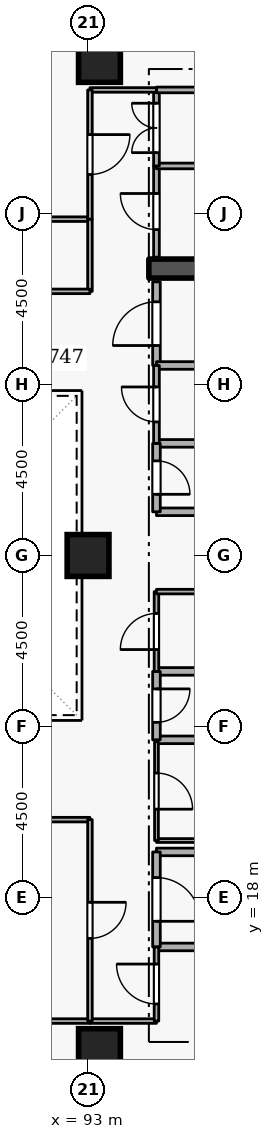
"""IFC4 building model, lengths in metres.
Left out: names, types, materials, properties, quantities, classifications, styles, units other than length and angle.
Written with IfcOpenShell. Run it as: python <this file> out.ifc"""

import sys

from ifc_helpers import new_model, si_unit, direction, frame, frame_2d, origin, origin_2d, place, context, subcontext, project, spatial, rectangle, extrude, element, fill, save


model = new_model("IFC4")
c1 = context("Model", 3, precision=1e-05, world=origin(), true_north=direction((0.0, 1.0)))
c2 = subcontext(c1, "Body", "Model", "MODEL_VIEW")
j1 = project(units=[si_unit("LENGTHUNIT", "METRE"), si_unit("PLANEANGLEUNIT", "RADIAN")], contexts=[c1])
p1 = place(None, origin())
s1 = spatial("IfcSite", under=j1, at=p1, CompositionType="ELEMENT")
p2 = place(p1, origin())
s2 = spatial("IfcBuilding", under=s1, at=p2, CompositionType="ELEMENT")
p3 = place(p2, frame((0.0, 0.0, 145.5)))
s3 = spatial("IfcBuildingStorey", under=s2, at=p3, CompositionType="ELEMENT", Elevation=145.5)
p4 = place(p3, frame((94.6, 34.55, 0.0), z_axis=(0.0, 0.0, 1.0), x_axis=(1.0, 0.0, 0.0)))
e1 = element("IfcWall", 1, at=p4, inside=s3, PredefinedType="SHEAR", context=c2, shape_type="SweptSolid", body=[
    extrude(rectangle(XDim=5.8, YDim=0.5, at=frame_2d((2.9, 0.0))), origin(), (0.0, 0.0, 1.0), 3.6),
])
for number, where, z_axis, x_axis in (
    (2, (93.3, 14.0, 0.0), (0.0, 0.0, 1.0), (1.0, 0.0, 0.0)),
    (3, (93.3, 40.0, 0.0), (0.0, 0.0, 1.0), (1.0, 0.0, 0.0)),
    (4, (93.0, 27.0, 0.0), (0.0, 0.0, 1.0), (1.0, 0.0, 0.0)),
):
    element("IfcColumn", number, at=place(p3, frame(where, z_axis=z_axis, x_axis=x_axis)), inside=s3, PredefinedType="COLUMN", context=c2, shape_type="SweptSolid", body=[
        extrude(rectangle(XDim=1.1, YDim=1.1, at=origin_2d()), origin(), (0.0, 0.0, 1.0), 3.6),
    ])
p5 = place(p3, frame((94.8, 16.7, 0.0), z_axis=(0.0, 0.0, 1.0), x_axis=(1.0, 0.0, 0.0)))
e5 = element("IfcWall", 5, at=p5, inside=s3, PredefinedType="STANDARD", context=c2, shape_type="SweptSolid", body=[
    extrude(rectangle(XDim=5.7, YDim=0.2, at=frame_2d((2.85, 0.0))), origin(), (0.0, 0.0, 1.0), 3.3),
])
p6 = place(p3, frame((97.1, 19.2, 0.0), z_axis=(0.0, 0.0, 1.0), x_axis=(-1.0, 0.0, 0.0)))
e6 = element("IfcWall", 6, at=p6, inside=s3, PredefinedType="STANDARD", context=c2, shape_type="SweptSolid", body=[
    extrude(rectangle(XDim=2.3, YDim=0.2, at=frame_2d((1.15, 0.0))), origin(), (0.0, 0.0, 1.0), 2.505),
])
p7 = place(p3, frame((94.8, 19.2, 0.0), z_axis=(0.0, 0.0, 1.0), x_axis=(0.0, -1.0, 0.0)))
e7 = element("IfcWall", 7, at=p7, inside=s3, PredefinedType="STANDARD", context=c2, shape_type="SweptSolid", body=[
    extrude(rectangle(XDim=2.5, YDim=0.2, at=frame_2d((1.25, 0.0))), origin(), (0.0, 0.0, 1.0), 3.3),
])
p8 = place(p7, frame((0.675, 0.0, 0.0)))
e8 = element("IfcOpeningElement", 8, at=p8, cuts=e7, PredefinedType="OPENING", context=c2, shape_type="SweptSolid", body=[
    extrude(rectangle(XDim=1.15, YDim=2.1, at=frame_2d((0.575, 1.05))), frame((0.0, 0.11, 0.0), z_axis=(0.0, -1.0, 0.0), x_axis=(1.0, 0.0, 0.0)), (0.0, 0.0, 1.0), 0.22),
])
for number, where, z_axis, x_axis in (
    (9, (94.8, 28.15, 0.0), (0.0, 0.0, 1.0), (1.0, 0.0, 0.0)),
    (10, (96.85, 29.95, 0.0), (0.0, 0.0, 1.0), (-1.0, 0.0, 0.0)),
):
    element("IfcWall", number, at=place(p3, frame(where, z_axis=z_axis, x_axis=x_axis)), inside=s3, PredefinedType="STANDARD", context=c2, shape_type="SweptSolid", body=[
        extrude(rectangle(XDim=2.05, YDim=0.2, at=frame_2d((1.025, 0.0))), origin(), (0.0, 0.0, 1.0), 3.3),
    ])
p9 = place(p3, frame((94.8, 29.95, 0.0), z_axis=(0.0, 0.0, 1.0), x_axis=(0.0, -1.0, 0.0)))
e11 = element("IfcWall", 11, at=p9, inside=s3, PredefinedType="STANDARD", context=c2, shape_type="SweptSolid", body=[
    extrude(rectangle(XDim=1.8, YDim=0.2, at=frame_2d((0.9, 0.0))), origin(), (0.0, 0.0, 1.0), 3.3),
])
p10 = place(p9, frame((0.46, 0.0, 0.0)))
e12 = element("IfcOpeningElement", 12, at=p10, cuts=e11, PredefinedType="OPENING", context=c2, shape_type="SweptSolid", body=[
    extrude(rectangle(XDim=0.88, YDim=2.04, at=frame_2d((0.44, 1.02))), frame((0.0, 0.11, 0.0), z_axis=(0.0, -1.0, 0.0), x_axis=(1.0, 0.0, 0.0)), (0.0, 0.0, 1.0), 0.22),
])
for number, where, z_axis, x_axis in (
    (13, (94.8, 22.15, 0.0), (0.0, 0.0, 1.0), (1.0, 0.0, 0.0)),
    (14, (96.85, 23.95, 0.0), (0.0, 0.0, 1.0), (-1.0, 0.0, 0.0)),
):
    element("IfcWall", number, at=place(p3, frame(where, z_axis=z_axis, x_axis=x_axis)), inside=s3, PredefinedType="STANDARD", context=c2, shape_type="SweptSolid", body=[
        extrude(rectangle(XDim=2.05, YDim=0.2, at=frame_2d((1.025, 0.0))), origin(), (0.0, 0.0, 1.0), 3.3),
    ])
p11 = place(p3, frame((94.8, 23.95, 0.0), z_axis=(0.0, 0.0, 1.0), x_axis=(0.0, -1.0, 0.0)))
e15 = element("IfcWall", 15, at=p11, inside=s3, PredefinedType="STANDARD", context=c2, shape_type="SweptSolid", body=[
    extrude(rectangle(XDim=1.8, YDim=0.2, at=frame_2d((0.9, 0.0))), origin(), (0.0, 0.0, 1.0), 3.3),
])
p12 = place(p11, frame((0.46, 0.0, 0.0)))
e16 = element("IfcOpeningElement", 16, at=p12, cuts=e15, PredefinedType="OPENING", context=c2, shape_type="SweptSolid", body=[
    extrude(rectangle(XDim=0.88, YDim=2.04, at=frame_2d((0.44, 1.02))), frame((0.0, 0.11, 0.0), z_axis=(0.0, -1.0, 0.0), x_axis=(1.0, 0.0, 0.0)), (0.0, 0.0, 1.0), 0.22),
])
p13 = place(p3, frame((94.8, 32.0, 0.0), z_axis=(0.0, 0.0, 1.0), x_axis=(0.0, 1.0, 0.0)))
e17 = element("IfcWall", 17, at=p13, inside=s3, PredefinedType="STANDARD", context=c2, shape_type="SweptSolid", body=[
    extrude(rectangle(XDim=2.2, YDim=0.2, at=frame_2d((1.1, 0.0))), origin(), (0.0, 0.0, 1.0), 3.3),
])
p14 = place(p13, frame((0.525, 0.0, 0.0)))
e18 = element("IfcOpeningElement", 18, at=p14, cuts=e17, PredefinedType="OPENING", context=c2, shape_type="SweptSolid", body=[
    extrude(rectangle(XDim=1.15, YDim=2.1, at=frame_2d((0.575, 1.05))), frame((0.0, 0.11, 0.0), z_axis=(0.0, -1.0, 0.0), x_axis=(1.0, 0.0, 0.0)), (0.0, 0.0, 1.0), 0.22),
])
p15 = place(p3, frame((96.85, 32.0, 0.0), z_axis=(0.0, 0.0, 1.0), x_axis=(-1.0, 0.0, 0.0)))
e19 = element("IfcWall", 19, at=p15, inside=s3, PredefinedType="STANDARD", context=c2, shape_type="SweptSolid", body=[
    extrude(rectangle(XDim=2.05, YDim=0.2, at=frame_2d((1.025, 0.0))), origin(), (0.0, 0.0, 1.0), 3.3),
])
p16 = place(p3, frame((94.8, 19.5, 0.0), z_axis=(0.0, 0.0, 1.0), x_axis=(1.0, 0.0, 0.0)))
e20 = element("IfcWall", 20, at=p16, inside=s3, PredefinedType="PARTITIONING", context=c2, shape_type="SweptSolid", body=[
    extrude(rectangle(XDim=2.05, YDim=0.1, at=frame_2d((1.025, 0.0))), origin(), (0.0, 0.0, 1.0), 2.505),
])
p17 = place(p3, frame((94.8, 22.1, 0.0), z_axis=(0.0, 0.0, 1.0), x_axis=(0.0, -1.0, 0.0)))
e21 = element("IfcWall", 21, at=p17, inside=s3, PredefinedType="PARTITIONING", context=c2, shape_type="SweptSolid", body=[
    extrude(rectangle(XDim=2.6, YDim=0.1, at=frame_2d((1.3, 0.0))), origin(), (0.0, 0.0, 1.0), 3.3),
])
p18 = place(p17, frame((0.825, 0.0, 0.0)))
e22 = element("IfcOpeningElement", 22, at=p18, cuts=e21, PredefinedType="OPENING", context=c2, shape_type="SweptSolid", body=[
    extrude(rectangle(XDim=0.95, YDim=2.1, at=frame_2d((0.475, 1.05))), frame((0.0, 0.06, 0.0), z_axis=(0.0, -1.0, 0.0), x_axis=(1.0, 0.0, 0.0)), (0.0, 0.0, 1.0), 0.12),
])
p19 = place(p3, frame((94.8, 23.95, 0.0), z_axis=(0.0, 0.0, 1.0), x_axis=(0.0, 1.0, 0.0)))
e23 = element("IfcWall", 23, at=p19, inside=s3, PredefinedType="PARTITIONING", context=c2, shape_type="SweptSolid", body=[
    extrude(rectangle(XDim=2.1, YDim=0.12, at=frame_2d((1.05, 0.0))), origin(), (0.0, 0.0, 1.0), 3.3),
])
p20 = place(p19, frame((0.575, 0.0, 0.0)))
e24 = element("IfcOpeningElement", 24, at=p20, cuts=e23, PredefinedType="OPENING", context=c2, shape_type="SweptSolid", body=[
    extrude(rectangle(XDim=0.95, YDim=2.1, at=frame_2d((0.475, 1.05))), frame((0.0, 0.07, 0.0), z_axis=(0.0, -1.0, 0.0), x_axis=(1.0, 0.0, 0.0)), (0.0, 0.0, 1.0), 0.14),
])
p21 = place(p3, frame((94.8, 26.05, 0.0), z_axis=(0.0, 0.0, 1.0), x_axis=(1.0, 0.0, 0.0)))
e25 = element("IfcWall", 25, at=p21, inside=s3, PredefinedType="PARTITIONING", context=c2, shape_type="SweptSolid", body=[
    extrude(rectangle(XDim=2.05, YDim=0.12, at=frame_2d((1.025, 0.0))), origin(), (0.0, 0.0, 1.0), 3.3),
])
p22 = place(p3, frame((94.8, 29.95, 0.0), z_axis=(0.0, 0.0, 1.0), x_axis=(0.0, 1.0, 0.0)))
e26 = element("IfcWall", 26, at=p22, inside=s3, PredefinedType="PARTITIONING", context=c2, shape_type="SweptSolid", body=[
    extrude(rectangle(XDim=2.05, YDim=0.15, at=frame_2d((1.025, 0.0))), origin(), (0.0, 0.0, 1.0), 3.3),
])
p23 = place(p22, frame((0.565, 0.0, 0.0)))
e27 = element("IfcOpeningElement", 27, at=p23, cuts=e26, PredefinedType="OPENING", context=c2, shape_type="SweptSolid", body=[
    extrude(rectangle(XDim=0.92, YDim=2.08, at=frame_2d((0.46, 1.04))), frame((0.0, 0.085, 0.0), z_axis=(0.0, -1.0, 0.0), x_axis=(1.0, 0.0, 0.0)), (0.0, 0.0, 1.0), 0.17),
])
p24 = place(p3, frame((94.8, 34.85, 0.0), z_axis=(0.0, 0.0, 1.0), x_axis=(0.0, 1.0, 0.0)))
e28 = element("IfcWall", 28, at=p24, inside=s3, PredefinedType="PARTITIONING", context=c2, shape_type="SweptSolid", body=[
    extrude(rectangle(XDim=2.4, YDim=0.15, at=frame_2d((1.2, 0.0))), origin(), (0.0, 0.0, 1.0), 3.3),
])
p25 = place(p24, frame((0.725, 0.0, 0.0)))
e29 = element("IfcOpeningElement", 29, at=p25, cuts=e28, PredefinedType="OPENING", context=c2, shape_type="SweptSolid", body=[
    extrude(rectangle(XDim=0.95, YDim=2.1, at=frame_2d((0.475, 1.05))), frame((0.0, 0.085, 0.0), z_axis=(0.0, -1.0, 0.0), x_axis=(1.0, 0.0, 0.0)), (0.0, 0.0, 1.0), 0.17),
])
p26 = place(p3, frame((94.8, 37.25, 0.0), z_axis=(0.0, 0.0, 1.0), x_axis=(1.0, 0.0, 0.0)))
e30 = element("IfcWall", 30, at=p26, inside=s3, PredefinedType="PARTITIONING", context=c2, shape_type="SweptSolid", body=[
    extrude(rectangle(XDim=5.65, YDim=0.15, at=frame_2d((2.825, 0.0))), origin(), (0.0, 0.0, 1.0), 3.3),
])
p27 = place(p3, frame((94.8, 37.25, 0.0), z_axis=(0.0, 0.0, 1.0), x_axis=(0.0, 1.0, 0.0)))
e31 = element("IfcWall", 31, at=p27, inside=s3, PredefinedType="PARTITIONING", context=c2, shape_type="SweptSolid", body=[
    extrude(rectangle(XDim=2.0, YDim=0.15, at=frame_2d((1.0, 0.0))), origin(), (0.0, 0.0, 1.0), 3.3),
])
p28 = place(p27, frame((0.35, 0.0, 0.0)))
e32 = element("IfcOpeningElement", 32, at=p28, cuts=e31, PredefinedType="OPENING", context=c2, shape_type="SweptSolid", body=[
    extrude(rectangle(XDim=1.3, YDim=2.12, at=frame_2d((0.65, 1.06))), frame((0.0, 0.085, 0.0), z_axis=(0.0, -1.0, 0.0), x_axis=(1.0, 0.0, 0.0)), (0.0, 0.0, 1.0), 0.17),
])
p29 = place(p3, frame((94.8, 39.25, 0.0), z_axis=(0.0, 0.0, 1.0), x_axis=(1.0, 0.0, 0.0)))
e33 = element("IfcWall", 33, at=p29, inside=s3, PredefinedType="PARTITIONING", context=c2, shape_type="SweptSolid", body=[
    extrude(rectangle(XDim=5.65, YDim=0.15, at=frame_2d((2.825, 0.0))), origin(), (0.0, 0.0, 1.0), 3.3),
])
p30 = place(p3, frame((88.5, 14.75, 0.0), z_axis=(0.0, 0.0, 1.0), x_axis=(1.0, 0.0, 0.0)))
e34 = element("IfcWall", 34, at=p30, inside=s3, PredefinedType="PARTITIONING", context=c2, shape_type="SweptSolid", body=[
    extrude(rectangle(XDim=4.55, YDim=0.12, at=frame_2d((2.275, 0.0))), origin(), (0.0, 0.0, 1.0), 3.3),
])
p31 = place(p3, frame((93.05, 14.75, 0.0), z_axis=(0.0, 0.0, 1.0), x_axis=(1.0, 0.0, 0.0)))
e35 = element("IfcWall", 35, at=p31, inside=s3, PredefinedType="PARTITIONING", context=c2, shape_type="SweptSolid", body=[
    extrude(rectangle(XDim=1.75, YDim=0.12, at=frame_2d((0.875, 0.0))), origin(), (0.0, 0.0, 1.0), 3.3),
])
p32 = place(p3, frame((94.8, 14.75, 0.0), z_axis=(0.0, 0.0, 1.0), x_axis=(0.0, 1.0, 0.0)))
e36 = element("IfcWall", 36, at=p32, inside=s3, PredefinedType="PARTITIONING", context=c2, shape_type="SweptSolid", body=[
    extrude(rectangle(XDim=1.95, YDim=0.12, at=frame_2d((0.975, 0.0))), origin(), (0.0, 0.0, 1.0), 3.3),
])
p33 = place(p32, frame((0.45, 0.0, 0.0)))
e37 = element("IfcOpeningElement", 37, at=p33, cuts=e36, PredefinedType="OPENING", context=c2, shape_type="SweptSolid", body=[
    extrude(rectangle(XDim=1.05, YDim=2.1, at=frame_2d((0.525, 1.05))), frame((0.0, 0.07, 0.0), z_axis=(0.0, -1.0, 0.0), x_axis=(1.0, 0.0, 0.0)), (0.0, 0.0, 1.0), 0.14),
])
p34 = place(p3, frame((88.5, 20.05, 0.0), z_axis=(0.0, 0.0, 1.0), x_axis=(1.0, 0.0, 0.0)))
e38 = element("IfcWall", 38, at=p34, inside=s3, PredefinedType="PARTITIONING", context=c2, shape_type="SweptSolid", body=[
    extrude(rectangle(XDim=4.55, YDim=0.12, at=frame_2d((2.275, 0.0))), origin(), (0.0, 0.0, 1.0), 3.3),
])
p35 = place(p3, frame((93.05, 20.05, 0.0), z_axis=(0.0, 0.0, 1.0), x_axis=(0.0, -1.0, 0.0)))
e39 = element("IfcWall", 39, at=p35, inside=s3, PredefinedType="PARTITIONING", context=c2, shape_type="SweptSolid", body=[
    extrude(rectangle(XDim=5.3, YDim=0.12, at=frame_2d((2.65, 0.0))), origin(), (0.0, 0.0, 1.0), 3.3),
])
p36 = place(p35, frame((2.175, 0.0, 0.0)))
e40 = element("IfcOpeningElement", 40, at=p36, cuts=e39, PredefinedType="OPENING", context=c2, shape_type="SweptSolid", body=[
    extrude(rectangle(XDim=0.95, YDim=2.1, at=frame_2d((0.475, 1.05))), frame((0.0, 0.07, 0.0), z_axis=(0.0, -1.0, 0.0), x_axis=(1.0, 0.0, 0.0)), (0.0, 0.0, 1.0), 0.14),
])
p37 = place(p3, frame((88.5, 35.85, 0.0), z_axis=(0.0, 0.0, 1.0), x_axis=(1.0, 0.0, 0.0)))
e41 = element("IfcWall", 41, at=p37, inside=s3, PredefinedType="PARTITIONING", context=c2, shape_type="SweptSolid", body=[
    extrude(rectangle(XDim=4.55, YDim=0.12, at=frame_2d((2.275, 0.0))), origin(), (0.0, 0.0, 1.0), 3.3),
])
p38 = place(p3, frame((93.05, 35.85, 0.0), z_axis=(0.0, 0.0, 1.0), x_axis=(0.0, -1.0, 0.0)))
e42 = element("IfcWall", 42, at=p38, inside=s3, PredefinedType="PARTITIONING", context=c2, shape_type="SweptSolid", body=[
    extrude(rectangle(XDim=1.9, YDim=0.12, at=frame_2d((0.95, 0.0))), origin(), (0.0, 0.0, 1.0), 3.3),
])
p39 = place(p3, frame((93.05, 33.95, 0.0), z_axis=(0.0, 0.0, 1.0), x_axis=(-1.0, 0.0, 0.0)))
e43 = element("IfcWall", 43, at=p39, inside=s3, PredefinedType="PARTITIONING", context=c2, shape_type="SweptSolid", body=[
    extrude(rectangle(XDim=4.55, YDim=0.12, at=frame_2d((2.275, 0.0))), origin(), (0.0, 0.0, 1.0), 3.3),
])
p40 = place(p39, frame((1.8, 0.0, 0.0)))
e44 = element("IfcOpeningElement", 44, at=p40, cuts=e43, PredefinedType="OPENING", context=c2, shape_type="SweptSolid", body=[
    extrude(rectangle(XDim=0.95, YDim=2.1, at=frame_2d((0.475, 1.05))), frame((0.0, 0.07, 0.0), z_axis=(0.0, -1.0, 0.0), x_axis=(1.0, 0.0, 0.0)), (0.0, 0.0, 1.0), 0.14),
])
p41 = place(p3, frame((94.8, 39.25, 0.0), z_axis=(0.0, 0.0, 1.0), x_axis=(-1.0, 0.0, 0.0)))
e45 = element("IfcWall", 45, at=p41, inside=s3, PredefinedType="PARTITIONING", context=c2, shape_type="SweptSolid", body=[
    extrude(rectangle(XDim=1.75, YDim=0.12, at=frame_2d((0.875, 0.0))), origin(), (0.0, 0.0, 1.0), 3.3),
])
p42 = place(p3, frame((93.05, 39.25, 0.0), z_axis=(0.0, 0.0, 1.0), x_axis=(0.0, -1.0, 0.0)))
e46 = element("IfcWall", 46, at=p42, inside=s3, PredefinedType="PARTITIONING", context=c2, shape_type="SweptSolid", body=[
    extrude(rectangle(XDim=3.4, YDim=0.12, at=frame_2d((1.7, 0.0))), origin(), (0.0, 0.0, 1.0), 3.3),
])
p43 = place(p42, frame((1.175, 0.0, 0.0)))
e47 = element("IfcOpeningElement", 47, at=p43, cuts=e46, PredefinedType="OPENING", context=c2, shape_type="SweptSolid", body=[
    extrude(rectangle(XDim=1.05, YDim=2.1, at=frame_2d((0.525, 1.05))), frame((0.0, 0.07, 0.0), z_axis=(0.0, -1.0, 0.0), x_axis=(1.0, 0.0, 0.0)), (0.0, 0.0, 1.0), 0.14),
])
p44 = place(p8, origin())
e48 = element("IfcDoor", 48, at=p44, inside=s3, OperationType="SINGLE_SWING_RIGHT", PredefinedType="DOOR", context=c2, shape_type="SweptSolid", body=[
    extrude(rectangle(XDim=1.15, YDim=2.1, at=frame_2d((0.575, 1.05))), frame((0.0, 0.025, 0.0), z_axis=(0.0, -1.0, 0.0), x_axis=(1.0, 0.0, 0.0)), (0.0, 0.0, 1.0), 0.05),
])
fill(e8, e48)
p45 = place(p10, origin())
e49 = element("IfcDoor", 49, at=p45, inside=s3, OperationType="SINGLE_SWING_RIGHT", PredefinedType="DOOR", context=c2, shape_type="SweptSolid", body=[
    extrude(rectangle(XDim=0.88, YDim=2.04, at=frame_2d((0.44, 1.02))), frame((0.0, 0.025, 0.0), z_axis=(0.0, -1.0, 0.0), x_axis=(1.0, 0.0, 0.0)), (0.0, 0.0, 1.0), 0.05),
])
fill(e12, e49)
p46 = place(p12, origin())
e50 = element("IfcDoor", 50, at=p46, inside=s3, OperationType="SINGLE_SWING_LEFT", PredefinedType="DOOR", context=c2, shape_type="SweptSolid", body=[
    extrude(rectangle(XDim=0.88, YDim=2.04, at=frame_2d((0.44, 1.02))), frame((0.0, 0.025, 0.0), z_axis=(0.0, -1.0, 0.0), x_axis=(1.0, 0.0, 0.0)), (0.0, 0.0, 1.0), 0.05),
])
fill(e16, e50)
p47 = place(p18, origin())
e51 = element("IfcDoor", 51, at=p47, inside=s3, OperationType="SINGLE_SWING_RIGHT", PredefinedType="DOOR", context=c2, shape_type="SweptSolid", body=[
    extrude(rectangle(XDim=0.95, YDim=2.1, at=frame_2d((0.475, 1.05))), frame((0.0, 0.025, 0.0), z_axis=(0.0, -1.0, 0.0), x_axis=(1.0, 0.0, 0.0)), (0.0, 0.0, 1.0), 0.05),
])
fill(e22, e51)
p48 = place(p20, origin())
e52 = element("IfcDoor", 52, at=p48, inside=s3, OperationType="SINGLE_SWING_LEFT", PredefinedType="DOOR", context=c2, shape_type="SweptSolid", body=[
    extrude(rectangle(XDim=0.95, YDim=2.1, at=frame_2d((0.475, 1.05))), frame((0.0, 0.025, 0.0), z_axis=(0.0, -1.0, 0.0), x_axis=(1.0, 0.0, 0.0)), (0.0, 0.0, 1.0), 0.05),
])
fill(e24, e52)
p49 = place(p23, origin())
e53 = element("IfcDoor", 53, at=p49, inside=s3, OperationType="SINGLE_SWING_RIGHT", PredefinedType="DOOR", context=c2, shape_type="SweptSolid", body=[
    extrude(rectangle(XDim=0.92, YDim=2.08, at=frame_2d((0.46, 1.04))), frame((0.0, 0.025, 0.0), z_axis=(0.0, -1.0, 0.0), x_axis=(1.0, 0.0, 0.0)), (0.0, 0.0, 1.0), 0.05),
])
fill(e27, e53)
p50 = place(p14, origin())
e54 = element("IfcDoor", 54, at=p50, inside=s3, OperationType="SINGLE_SWING_LEFT", PredefinedType="DOOR", context=c2, shape_type="SweptSolid", body=[
    extrude(rectangle(XDim=1.15, YDim=2.1, at=frame_2d((0.575, 1.05))), frame((0.0, 0.025, 0.0), z_axis=(0.0, -1.0, 0.0), x_axis=(1.0, 0.0, 0.0)), (0.0, 0.0, 1.0), 0.05),
])
fill(e18, e54)
p51 = place(p25, origin())
e55 = element("IfcDoor", 55, at=p51, inside=s3, OperationType="SINGLE_SWING_RIGHT", PredefinedType="DOOR", context=c2, shape_type="SweptSolid", body=[
    extrude(rectangle(XDim=0.95, YDim=2.1, at=frame_2d((0.475, 1.05))), frame((0.0, 0.025, 0.0), z_axis=(0.0, -1.0, 0.0), x_axis=(1.0, 0.0, 0.0)), (0.0, 0.0, 1.0), 0.05),
])
fill(e29, e55)
p52 = place(p28, origin())
e56 = element("IfcDoor", 56, at=p52, inside=s3, OperationType="DOUBLE_DOOR_SINGLE_SWING", PredefinedType="DOOR", context=c2, shape_type="SweptSolid", body=[
    extrude(rectangle(XDim=1.3, YDim=2.12, at=frame_2d((0.65, 1.06))), frame((0.0, 0.025, 0.0), z_axis=(0.0, -1.0, 0.0), x_axis=(1.0, 0.0, 0.0)), (0.0, 0.0, 1.0), 0.05),
])
fill(e32, e56)
p53 = place(p33, origin())
e57 = element("IfcDoor", 57, at=p53, inside=s3, OperationType="SINGLE_SWING_RIGHT", PredefinedType="DOOR", context=c2, shape_type="SweptSolid", body=[
    extrude(rectangle(XDim=1.05, YDim=2.1, at=frame_2d((0.525, 1.05))), frame((0.0, 0.025, 0.0), z_axis=(0.0, -1.0, 0.0), x_axis=(1.0, 0.0, 0.0)), (0.0, 0.0, 1.0), 0.05),
])
fill(e37, e57)
p54 = place(p36, origin())
e58 = element("IfcDoor", 58, at=p54, inside=s3, OperationType="SINGLE_SWING_LEFT", PredefinedType="DOOR", context=c2, shape_type="SweptSolid", body=[
    extrude(rectangle(XDim=0.95, YDim=2.1, at=frame_2d((0.475, 1.05))), frame((0.0, 0.025, 0.0), z_axis=(0.0, -1.0, 0.0), x_axis=(1.0, 0.0, 0.0)), (0.0, 0.0, 1.0), 0.05),
])
fill(e40, e58)
p55 = place(p43, origin())
e59 = element("IfcDoor", 59, at=p55, inside=s3, OperationType="SINGLE_SWING_LEFT", PredefinedType="DOOR", context=c2, shape_type="SweptSolid", body=[
    extrude(rectangle(XDim=1.05, YDim=2.1, at=frame_2d((0.525, 1.05))), frame((0.0, 0.025, 0.0), z_axis=(0.0, -1.0, 0.0), x_axis=(1.0, 0.0, 0.0)), (0.0, 0.0, 1.0), 0.05),
])
fill(e47, e59)
save(model, sys.argv[1])
